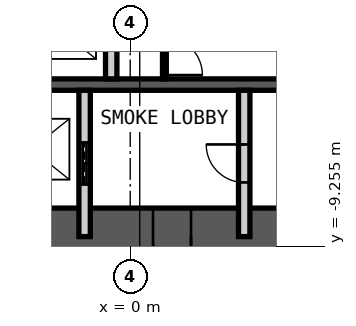
"""IFC4 building model, lengths in metres.
Left out: names, types, materials, properties, quantities, classifications, styles, units other than length and angle.
Written with IfcOpenShell. Run it as: python <this file> out.ifc"""

import sys

from ifc_helpers import new_model, si_unit, direction, frame, frame_2d, origin, place, context, subcontext, project, spatial, rectangle, extrude, element, fill, save


model = new_model("IFC4")
c1 = context("Model", 3, precision=1e-05, world=origin(), true_north=direction((0.0, 1.0)))
c2 = subcontext(c1, "Body", "Model", "MODEL_VIEW")
j1 = project(units=[si_unit("LENGTHUNIT", "METRE"), si_unit("PLANEANGLEUNIT", "RADIAN")], contexts=[c1])
p1 = place(None, origin())
s1 = spatial("IfcSite", under=j1, at=p1, CompositionType="ELEMENT")
p2 = place(p1, origin())
s2 = spatial("IfcBuilding", under=s1, at=p2, CompositionType="ELEMENT")
p3 = place(p2, frame((0.0, 0.0, 174.4)))
s3 = spatial("IfcBuildingStorey", under=s2, at=p3, CompositionType="ELEMENT", Elevation=174.4)
p4 = place(p3, frame((-12.0, -9.0, 0.0), z_axis=(0.0, 0.0, 1.0), x_axis=(1.0, 0.0, 0.0)))
e1 = element("IfcWall", 1, at=p4, inside=s3, PredefinedType="SHEAR", context=c2, shape_type="SweptSolid", body=[
    extrude(rectangle(XDim=24.0, YDim=1.5, at=frame_2d((12.0, 0.0))), origin(), (0.0, 0.0, 1.0), 6.0),
])
p5 = place(p4, frame((1.35, 0.0, 0.0)))
e2 = element("IfcOpeningElement", 2, at=p5, cuts=e1, PredefinedType="OPENING", context=c2, shape_type="SweptSolid", body=[
    extrude(rectangle(XDim=1.0, YDim=2.1, at=frame_2d((0.5, 1.05))), frame((0.0, 0.76, 0.0), z_axis=(0.0, -1.0, 0.0), x_axis=(1.0, 0.0, 0.0)), (0.0, 0.0, 1.0), 1.52),
])
p6 = place(p4, frame((5.325, 0.0, 0.0)))
e3 = element("IfcOpeningElement", 3, at=p6, cuts=e1, PredefinedType="OPENING", context=c2, shape_type="SweptSolid", body=[
    extrude(rectangle(XDim=1.15, YDim=2.1, at=frame_2d((0.575, 1.05))), frame((0.0, 0.76, 0.0), z_axis=(0.0, -1.0, 0.0), x_axis=(1.0, 0.0, 0.0)), (0.0, 0.0, 1.0), 1.52),
])
p7 = place(p4, frame((12.6, 0.0, 0.0)))
e4 = element("IfcOpeningElement", 4, at=p7, cuts=e1, PredefinedType="OPENING", context=c2, shape_type="SweptSolid", body=[
    extrude(rectangle(XDim=1.0, YDim=2.1, at=frame_2d((0.5, 1.05))), frame((0.0, 0.76, 0.0), z_axis=(0.0, -1.0, 0.0), x_axis=(1.0, 0.0, 0.0)), (0.0, 0.0, 1.0), 1.52),
])
p8 = place(p3, frame((-12.0, -5.0, 0.0), z_axis=(0.0, 0.0, 1.0), x_axis=(1.0, 0.0, 0.0)))
e5 = element("IfcWall", 5, at=p8, inside=s3, PredefinedType="SHEAR", context=c2, shape_type="SweptSolid", body=[
    extrude(rectangle(XDim=24.0, YDim=0.3, at=frame_2d((12.0, 0.0))), origin(), (0.0, 0.0, 1.0), 6.0),
])
p9 = place(p3, frame((-0.5, -4.85, 0.0), z_axis=(0.0, 0.0, 1.0), x_axis=(0.0, 1.0, 0.0)))
e6 = element("IfcWall", 6, at=p9, inside=s3, PredefinedType="PARTITIONING", context=c2, shape_type="SweptSolid", body=[
    extrude(rectangle(XDim=2.65, YDim=0.3, at=frame_2d((1.325, 0.0))), origin(), (0.0, 0.0, 1.0), 5.78),
])
p10 = place(p3, frame((-1.2, -9.0, 0.0), z_axis=(0.0, 0.0, 1.0), x_axis=(0.0, 1.0, 0.0)))
e7 = element("IfcWall", 7, at=p10, inside=s3, PredefinedType="PARTITIONING", context=c2, shape_type="SweptSolid", body=[
    extrude(rectangle(XDim=3.85, YDim=0.3, at=frame_2d((1.925, 0.0))), origin(), (0.0, 0.0, 1.0), 5.78),
])
p11 = place(p10, frame((1.375, 0.0, 0.0)))
e8 = element("IfcOpeningElement", 8, at=p11, cuts=e7, PredefinedType="OPENING", context=c2, shape_type="SweptSolid", body=[
    extrude(rectangle(XDim=1.1, YDim=2.4, at=frame_2d((0.55, 1.2))), frame((0.0, 0.16, 0.0), z_axis=(0.0, -1.0, 0.0), x_axis=(1.0, 0.0, 0.0)), (0.0, 0.0, 1.0), 0.32),
])
p12 = place(p3, frame((3.0, -9.0, 0.0), z_axis=(0.0, 0.0, 1.0), x_axis=(0.0, 1.0, 0.0)))
e9 = element("IfcWall", 9, at=p12, inside=s3, PredefinedType="PARTITIONING", context=c2, shape_type="SweptSolid", body=[
    extrude(rectangle(XDim=3.85, YDim=0.3, at=frame_2d((1.925, 0.0))), origin(), (0.0, 0.0, 1.0), 5.78),
])
p13 = place(p12, frame((1.425, 0.0, 0.0)))
e10 = element("IfcOpeningElement", 10, at=p13, cuts=e9, PredefinedType="OPENING", context=c2, shape_type="SweptSolid", body=[
    extrude(rectangle(XDim=1.0, YDim=2.1, at=frame_2d((0.5, 1.05))), frame((0.0, 0.16, 0.0), z_axis=(0.0, -1.0, 0.0), x_axis=(1.0, 0.0, 0.0)), (0.0, 0.0, 1.0), 0.32),
])
p14 = place(p3, frame((0.9, -4.85, 0.0), z_axis=(0.0, 0.0, 1.0), x_axis=(0.0, 1.0, 0.0)))
e11 = element("IfcWall", 11, at=p14, inside=s3, PredefinedType="PARTITIONING", context=c2, shape_type="SweptSolid", body=[
    extrude(rectangle(XDim=2.65, YDim=0.1, at=frame_2d((1.325, 0.0))), origin(), (0.0, 0.0, 1.0), 5.78),
])
p15 = place(p14, frame((0.1, 0.0, 0.0)))
e12 = element("IfcOpeningElement", 12, at=p15, cuts=e11, PredefinedType="OPENING", context=c2, shape_type="SweptSolid", body=[
    extrude(rectangle(XDim=1.0, YDim=2.4, at=frame_2d((0.5, 1.2))), frame((0.0, 0.06, 0.0), z_axis=(0.0, -1.0, 0.0), x_axis=(1.0, 0.0, 0.0)), (0.0, 0.0, 1.0), 0.12),
])
p16 = place(p7, origin())
e13 = element("IfcDoor", 13, at=p16, inside=s3, OperationType="SINGLE_SWING_RIGHT", PredefinedType="DOOR", context=c2, shape_type="SweptSolid", body=[
    extrude(rectangle(XDim=1.0, YDim=2.1, at=frame_2d((0.5, 1.05))), frame((0.0, 0.025, 0.0), z_axis=(0.0, -1.0, 0.0), x_axis=(1.0, 0.0, 0.0)), (0.0, 0.0, 1.0), 0.05),
])
fill(e4, e13)
p17 = place(p13, origin())
e14 = element("IfcDoor", 14, at=p17, inside=s3, OperationType="SINGLE_SWING_LEFT", PredefinedType="DOOR", context=c2, shape_type="SweptSolid", body=[
    extrude(rectangle(XDim=1.0, YDim=2.1, at=frame_2d((0.5, 1.05))), frame((0.0, 0.025, 0.0), z_axis=(0.0, -1.0, 0.0), x_axis=(1.0, 0.0, 0.0)), (0.0, 0.0, 1.0), 0.05),
])
fill(e10, e14)
p18 = place(p11, origin())
e15 = element("IfcDoor", 15, at=p18, inside=s3, OperationType="DOUBLE_DOOR_SLIDING", PredefinedType="DOOR", context=c2, shape_type="SweptSolid", body=[
    extrude(rectangle(XDim=1.1, YDim=2.4, at=frame_2d((0.55, 1.2))), frame((0.0, 0.025, 0.0), z_axis=(0.0, -1.0, 0.0), x_axis=(1.0, 0.0, 0.0)), (0.0, 0.0, 1.0), 0.05),
])
fill(e8, e15)
p19 = place(p15, origin())
e16 = element("IfcDoor", 16, at=p19, inside=s3, OperationType="SINGLE_SWING_LEFT", PredefinedType="DOOR", context=c2, shape_type="SweptSolid", body=[
    extrude(rectangle(XDim=1.0, YDim=2.4, at=frame_2d((0.5, 1.2))), frame((0.0, 0.025, 0.0), z_axis=(0.0, -1.0, 0.0), x_axis=(1.0, 0.0, 0.0)), (0.0, 0.0, 1.0), 0.05),
])
fill(e12, e16)
save(model, sys.argv[1])
